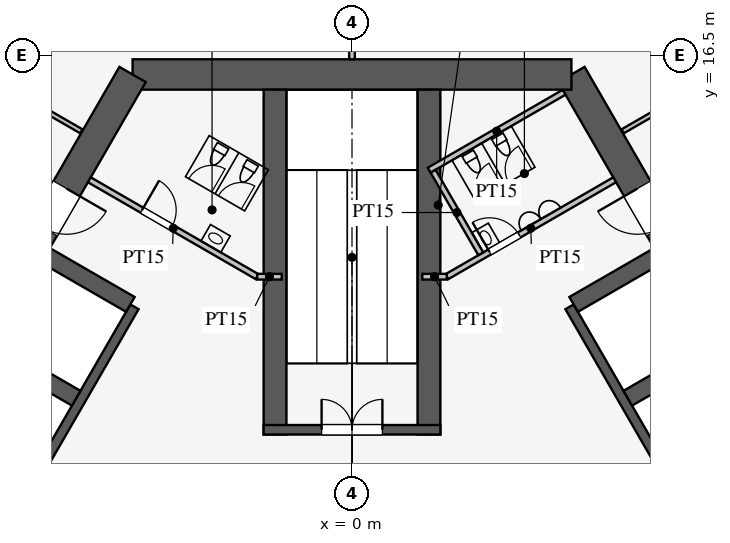
"""IFC4 building model, lengths in metres.
Left out: names, types, materials, properties, quantities, classifications, styles, units other than length and angle.
Written with IfcOpenShell. Run it as: python <this file> out.ifc"""

import sys

from ifc_helpers import new_model, si_unit, direction, frame, frame_2d, origin, place, context, subcontext, project, spatial, rectangle, extrude, element, fill, save


model = new_model("IFC4")
c1 = context("Model", 3, precision=1e-05, world=origin(), true_north=direction((0.0, 1.0)))
c2 = subcontext(c1, "Body", "Model", "MODEL_VIEW")
j1 = project(units=[si_unit("LENGTHUNIT", "METRE"), si_unit("PLANEANGLEUNIT", "RADIAN")], contexts=[c1])
p1 = place(None, origin())
s1 = spatial("IfcSite", under=j1, at=p1, CompositionType="ELEMENT")
p2 = place(p1, origin())
s2 = spatial("IfcBuilding", under=s1, at=p2, CompositionType="ELEMENT")
p3 = place(p2, frame((0.0, 0.0, 92.1)))
s3 = spatial("IfcBuildingStorey", under=s2, at=p3, CompositionType="ELEMENT", Elevation=92.1)
p4 = place(p3, frame((16.743, -3.0, 0.0), z_axis=(0.0, 0.0, 1.0), x_axis=(-0.500002442456, 0.866023993627, 0.0)))
e1 = element("IfcWall", 1, at=p4, inside=s3, PredefinedType="SHEAR", context=c2, shape_type="SweptSolid", body=[
    extrude(rectangle(XDim=21.939, YDim=0.8, at=frame_2d((10.97, 0.0))), origin(), (0.0, 0.0, 1.0), 6.0),
])
p5 = place(p4, frame((17.27, 0.0, 0.0)))
e2 = element("IfcOpeningElement", 2, at=p5, cuts=e1, PredefinedType="OPENING", context=c2, shape_type="SweptSolid", body=[
    extrude(rectangle(XDim=1.2, YDim=2.1, at=frame_2d((0.6, 1.05))), frame((0.0, 0.41, 0.0), z_axis=(0.0, -1.0, 0.0), x_axis=(1.0, 0.0, 0.0)), (0.0, 0.0, 1.0), 0.82),
])
p6 = place(p4, frame((3.47, 0.0, 0.0)))
e3 = element("IfcOpeningElement", 3, at=p6, cuts=e1, PredefinedType="OPENING", context=c2, shape_type="SweptSolid", body=[
    extrude(rectangle(XDim=1.2, YDim=2.1, at=frame_2d((0.6, 1.05))), frame((0.0, 0.41, 0.0), z_axis=(0.0, -1.0, 0.0), x_axis=(1.0, 0.0, 0.0)), (0.0, 0.0, 1.0), 0.82),
])
p7 = place(p3, frame((5.773, 16.0, 0.0), z_axis=(0.0, 0.0, 1.0), x_axis=(-1.0, 0.0, 0.0)))
e4 = element("IfcWall", 4, at=p7, inside=s3, PredefinedType="SHEAR", context=c2, shape_type="SweptSolid", body=[
    extrude(rectangle(XDim=11.547, YDim=0.8, at=frame_2d((5.773, 0.0))), origin(), (0.0, 0.0, 1.0), 6.0),
])
p8 = place(p3, frame((-5.773, 16.0, 0.0), z_axis=(0.0, 0.0, 1.0), x_axis=(-0.500002442456, -0.866023993627, 0.0)))
e5 = element("IfcWall", 5, at=p8, inside=s3, PredefinedType="SHEAR", context=c2, shape_type="SweptSolid", body=[
    extrude(rectangle(XDim=21.939, YDim=0.8, at=frame_2d((10.97, 0.0))), origin(), (0.0, 0.0, 1.0), 6.0),
])
p9 = place(p8, frame((17.27, 0.0, 0.0)))
e6 = element("IfcOpeningElement", 6, at=p9, cuts=e5, PredefinedType="OPENING", context=c2, shape_type="SweptSolid", body=[
    extrude(rectangle(XDim=1.2, YDim=2.1, at=frame_2d((0.6, 1.05))), frame((0.0, 0.41, 0.0), z_axis=(0.0, -1.0, 0.0), x_axis=(1.0, 0.0, 0.0)), (0.0, 0.0, 1.0), 0.82),
])
p10 = place(p8, frame((3.47, 0.0, 0.0)))
e7 = element("IfcOpeningElement", 7, at=p10, cuts=e5, PredefinedType="OPENING", context=c2, shape_type="SweptSolid", body=[
    extrude(rectangle(XDim=1.2, YDim=2.1, at=frame_2d((0.6, 1.05))), frame((0.0, 0.41, 0.0), z_axis=(0.0, -1.0, 0.0), x_axis=(1.0, 0.0, 0.0)), (0.0, 0.0, 1.0), 0.82),
])
p11 = place(p3, frame((11.424, 0.014, 0.0), z_axis=(0.0, 0.0, 1.0), x_axis=(-0.500001763848, 0.866024385424, 0.0)))
e8 = element("IfcWall", 8, at=p11, inside=s3, PredefinedType="SHEAR", context=c2, shape_type="SweptSolid", body=[
    extrude(rectangle(XDim=11.4, YDim=0.25, at=frame_2d((5.7, 0.0))), origin(), (0.0, 0.0, 1.0), 6.0),
])
p12 = place(p3, frame((7.257, 7.481, 0.0), z_axis=(0.0, 0.0, 1.0), x_axis=(0.866046643894, 0.499963209246, 0.0)))
e9 = element("IfcWall", 9, at=p12, inside=s3, PredefinedType="SHEAR", context=c2, shape_type="SweptSolid", body=[
    extrude(rectangle(XDim=2.575, YDim=0.45, at=frame_2d((1.288, 0.0))), origin(), (0.0, 0.0, 1.0), 6.0),
])
p13 = place(p3, frame((5.832, 9.949, 0.0), z_axis=(0.0, 0.0, 1.0), x_axis=(0.866029291668, 0.499993265928, 0.0)))
e10 = element("IfcWall", 10, at=p13, inside=s3, PredefinedType="SHEAR", context=c2, shape_type="SweptSolid", body=[
    extrude(rectangle(XDim=2.575, YDim=0.45, at=frame_2d((1.288, 0.0))), origin(), (0.0, 0.0, 1.0), 6.0),
])
p14 = place(p3, frame((-5.724, 9.886, 0.0), z_axis=(0.0, 0.0, 1.0), x_axis=(-0.500001763848, -0.866024385424, 0.0)))
e11 = element("IfcWall", 11, at=p14, inside=s3, PredefinedType="SHEAR", context=c2, shape_type="SweptSolid", body=[
    extrude(rectangle(XDim=11.4, YDim=0.25, at=frame_2d((5.7, 0.0))), origin(), (0.0, 0.0, 1.0), 6.0),
])
p15 = place(p14, frame((6.525, 0.0, 0.0)))
e12 = element("IfcOpeningElement", 12, at=p15, cuts=e11, PredefinedType="OPENING", context=c2, shape_type="SweptSolid", body=[
    extrude(rectangle(XDim=1.2, YDim=2.2, at=frame_2d((0.6, 1.1))), frame((0.0, 0.135, 0.0), z_axis=(0.0, -1.0, 0.0), x_axis=(1.0, 0.0, 0.0)), (0.0, 0.0, 1.0), 0.27),
])
p16 = place(p14, frame((9.375, 0.0, 0.0)))
e13 = element("IfcOpeningElement", 13, at=p16, cuts=e11, PredefinedType="OPENING", context=c2, shape_type="SweptSolid", body=[
    extrude(rectangle(XDim=1.2, YDim=2.2, at=frame_2d((0.6, 1.1))), frame((0.0, 0.135, 0.0), z_axis=(0.0, -1.0, 0.0), x_axis=(1.0, 0.0, 0.0)), (0.0, 0.0, 1.0), 0.27),
])
p17 = place(p3, frame((-5.832, 9.949, 0.0), z_axis=(0.0, 0.0, 1.0), x_axis=(-0.866029291668, 0.499993265928, 0.0)))
e14 = element("IfcWall", 14, at=p17, inside=s3, PredefinedType="SHEAR", context=c2, shape_type="SweptSolid", body=[
    extrude(rectangle(XDim=2.575, YDim=0.45, at=frame_2d((1.288, 0.0))), origin(), (0.0, 0.0, 1.0), 6.0),
])
p18 = place(p3, frame((-7.257, 7.481, 0.0), z_axis=(0.0, 0.0, 1.0), x_axis=(-0.866046643894, 0.499963209246, 0.0)))
e15 = element("IfcWall", 15, at=p18, inside=s3, PredefinedType="SHEAR", context=c2, shape_type="SweptSolid", body=[
    extrude(rectangle(XDim=2.575, YDim=0.45, at=frame_2d((1.288, 0.0))), origin(), (0.0, 0.0, 1.0), 6.0),
])
for number, where, z_axis, x_axis in (
    (16, (2.025, 6.525, 0.0), (0.0, 0.0, 1.0), (0.0, 1.0, 0.0)),
    (17, (-2.025, 6.525, 0.0), (0.0, 0.0, 1.0), (0.0, 1.0, 0.0)),
):
    element("IfcWall", number, at=place(p3, frame(where, z_axis=z_axis, x_axis=x_axis)), inside=s3, PredefinedType="SHEAR", context=c2, shape_type="SweptSolid", body=[
        extrude(rectangle(XDim=9.075, YDim=0.6, at=frame_2d((4.538, 0.0))), origin(), (0.0, 0.0, 1.0), 6.0),
    ])
p19 = place(p3, frame((2.325, 6.65, 0.0), z_axis=(0.0, 0.0, 1.0), x_axis=(-1.0, 0.0, 0.0)))
e18 = element("IfcWall", 18, at=p19, inside=s3, PredefinedType="SHEAR", context=c2, shape_type="SweptSolid", body=[
    extrude(rectangle(XDim=4.65, YDim=0.25, at=frame_2d((2.325, 0.0))), origin(), (0.0, 0.0, 1.0), 6.0),
])
p20 = place(p19, frame((1.525, 0.0, 0.0)))
e19 = element("IfcOpeningElement", 19, at=p20, cuts=e18, PredefinedType="OPENING", context=c2, shape_type="SweptSolid", body=[
    extrude(rectangle(XDim=1.6, YDim=2.1, at=frame_2d((0.8, 1.05))), frame((0.0, 0.135, 0.0), z_axis=(0.0, -1.0, 0.0), x_axis=(1.0, 0.0, 0.0)), (0.0, 0.0, 1.0), 0.27),
])
p21 = place(p3, frame((2.495, 10.678, 0.0), z_axis=(0.0, 0.0, 1.0), x_axis=(0.86602216432, 0.500005610874, 0.0)))
e20 = element("IfcWall", 20, at=p21, inside=s3, PredefinedType="PARTITIONING", context=c2, shape_type="SweptSolid", body=[
    extrude(rectangle(XDim=5.1, YDim=0.15, at=frame_2d((2.55, 0.0))), origin(), (0.0, 0.0, 1.0), 5.8),
])
p22 = place(p21, frame((1.3, 0.0, 0.0)))
e21 = element("IfcOpeningElement", 21, at=p22, cuts=e20, PredefinedType="OPENING", context=c2, shape_type="SweptSolid", body=[
    extrude(rectangle(XDim=0.9, YDim=2.1, at=frame_2d((0.45, 1.05))), frame((0.0, 0.085, 0.0), z_axis=(0.0, -1.0, 0.0), x_axis=(1.0, 0.0, 0.0)), (0.0, 0.0, 1.0), 0.17),
])
p23 = place(p3, frame((-2.495, 10.678, 0.0), z_axis=(0.0, 0.0, 1.0), x_axis=(-0.86602216432, 0.500005610874, 0.0)))
e22 = element("IfcWall", 22, at=p23, inside=s3, PredefinedType="PARTITIONING", context=c2, shape_type="SweptSolid", body=[
    extrude(rectangle(XDim=5.1, YDim=0.15, at=frame_2d((2.55, 0.0))), origin(), (0.0, 0.0, 1.0), 5.8),
])
p24 = place(p23, frame((2.6, 0.0, 0.0)))
e23 = element("IfcOpeningElement", 23, at=p24, cuts=e22, PredefinedType="OPENING", context=c2, shape_type="SweptSolid", body=[
    extrude(rectangle(XDim=0.9, YDim=2.1, at=frame_2d((0.45, 1.05))), frame((0.0, 0.085, 0.0), z_axis=(0.0, -1.0, 0.0), x_axis=(1.0, 0.0, 0.0)), (0.0, 0.0, 1.0), 0.17),
])
for number, where, z_axis, x_axis in (
    (24, (2.495, 10.678, 0.0), (0.0, 0.0, 1.0), (-1.0, 0.0, 0.0)),
    (25, (-2.495, 10.678, 0.0), (0.0, 0.0, 1.0), (1.0, 0.0, 0.0)),
):
    element("IfcWall", number, at=place(p3, frame(where, z_axis=z_axis, x_axis=x_axis)), inside=s3, PredefinedType="PARTITIONING", context=c2, shape_type="SweptSolid", body=[
        extrude(rectangle(XDim=0.645, YDim=0.15, at=frame_2d((0.323, 0.0))), origin(), (0.0, 0.0, 1.0), 5.8),
    ])
p25 = place(p3, frame((2.031, 13.482, 0.0), z_axis=(0.0, 0.0, 1.0), x_axis=(0.866050731258, 0.499956128963, 0.0)))
e26 = element("IfcWall", 26, at=p25, inside=s3, PredefinedType="PARTITIONING", context=c2, shape_type="SweptSolid", body=[
    extrude(rectangle(XDim=4.1, YDim=0.15, at=frame_2d((2.05, 0.0))), origin(), (0.0, 0.0, 1.0), 5.8),
])
p26 = place(p3, frame((3.389, 11.281, 0.0), z_axis=(0.0, 0.0, 1.0), x_axis=(-0.499989096993, 0.866031698547, 0.0)))
e27 = element("IfcWall", 27, at=p26, inside=s3, PredefinedType="PARTITIONING", context=c2, shape_type="SweptSolid", body=[
    extrude(rectangle(XDim=2.51, YDim=0.15, at=frame_2d((1.255, 0.0))), origin(), (0.0, 0.0, 1.0), 5.8),
])
p27 = place(p3, frame((0.0, 16.4, 0.0), z_axis=(0.0, 0.0, 1.0), x_axis=(0.0, 1.0, 0.0)))
e28 = element("IfcWall", 28, at=p27, inside=s3, PredefinedType="PARTITIONING", context=c2, shape_type="SweptSolid", body=[
    extrude(rectangle(XDim=16.65, YDim=0.15, at=frame_2d((8.325, 0.0))), origin(), (0.0, 0.0, 1.0), 4.1),
])
p28 = place(p3, frame((7.122, 14.504, 0.0), z_axis=(0.0, 0.0, 1.0), x_axis=(0.866023947468, 0.500002522405, 0.0)))
e29 = element("IfcWall", 29, at=p28, inside=s3, PredefinedType="PARTITIONING", context=c2, shape_type="SweptSolid", body=[
    extrude(rectangle(XDim=11.771, YDim=0.12, at=frame_2d((5.886, 0.0))), origin(), (0.0, 0.0, 1.0), 2.9),
])
p29 = place(p28, frame((2.5, 0.0, 0.0)))
e30 = element("IfcOpeningElement", 30, at=p29, cuts=e29, PredefinedType="OPENING", context=c2, shape_type="SweptSolid", body=[
    extrude(rectangle(XDim=1.8, YDim=2.1, at=frame_2d((0.9, 1.05))), frame((0.0, 0.07, 0.0), z_axis=(0.0, -1.0, 0.0), x_axis=(1.0, 0.0, 0.0)), (0.0, 0.0, 1.0), 0.14),
])
p30 = place(p28, frame((7.6, 0.0, 0.0)))
e31 = element("IfcOpeningElement", 31, at=p30, cuts=e29, PredefinedType="OPENING", context=c2, shape_type="SweptSolid", body=[
    extrude(rectangle(XDim=1.8, YDim=2.1, at=frame_2d((0.9, 1.05))), frame((0.0, 0.07, 0.0), z_axis=(0.0, -1.0, 0.0), x_axis=(1.0, 0.0, 0.0)), (0.0, 0.0, 1.0), 0.14),
])
p31 = place(p3, frame((-7.122, 14.504, 0.0), z_axis=(0.0, 0.0, 1.0), x_axis=(-0.866023947468, 0.500002522405, 0.0)))
e32 = element("IfcWall", 32, at=p31, inside=s3, PredefinedType="PARTITIONING", context=c2, shape_type="SweptSolid", body=[
    extrude(rectangle(XDim=11.771, YDim=0.12, at=frame_2d((5.886, 0.0))), origin(), (0.0, 0.0, 1.0), 2.9),
])
p32 = place(p31, frame((2.5, 0.0, 0.0)))
e33 = element("IfcOpeningElement", 33, at=p32, cuts=e32, PredefinedType="OPENING", context=c2, shape_type="SweptSolid", body=[
    extrude(rectangle(XDim=1.8, YDim=2.1, at=frame_2d((0.9, 1.05))), frame((0.0, 0.07, 0.0), z_axis=(0.0, -1.0, 0.0), x_axis=(1.0, 0.0, 0.0)), (0.0, 0.0, 1.0), 0.14),
])
p33 = place(p31, frame((7.6, 0.0, 0.0)))
e34 = element("IfcOpeningElement", 34, at=p33, cuts=e32, PredefinedType="OPENING", context=c2, shape_type="SweptSolid", body=[
    extrude(rectangle(XDim=1.8, YDim=2.1, at=frame_2d((0.9, 1.05))), frame((0.0, 0.07, 0.0), z_axis=(0.0, -1.0, 0.0), x_axis=(1.0, 0.0, 0.0)), (0.0, 0.0, 1.0), 0.14),
])
p34 = place(p22, origin())
e35 = element("IfcDoor", 35, at=p34, inside=s3, OperationType="SINGLE_SWING_LEFT", PredefinedType="DOOR", context=c2, shape_type="SweptSolid", body=[
    extrude(rectangle(XDim=0.9, YDim=2.1, at=frame_2d((0.45, 1.05))), frame((0.0, 0.025, 0.0), z_axis=(0.0, -1.0, 0.0), x_axis=(1.0, 0.0, 0.0)), (0.0, 0.0, 1.0), 0.05),
])
fill(e21, e35)
p35 = place(p24, frame((0.9, 0.0, 0.0), z_axis=(0.0, 0.0, 1.0), x_axis=(-1.0, 0.0, 0.0)))
e36 = element("IfcDoor", 36, at=p35, inside=s3, OperationType="SINGLE_SWING_LEFT", PredefinedType="DOOR", context=c2, shape_type="SweptSolid", body=[
    extrude(rectangle(XDim=0.9, YDim=2.1, at=frame_2d((0.45, 1.05))), frame((0.0, 0.025, 0.0), z_axis=(0.0, -1.0, 0.0), x_axis=(1.0, 0.0, 0.0)), (0.0, 0.0, 1.0), 0.05),
])
fill(e23, e36)
p36 = place(p20, frame((1.6, 0.0, 0.0), z_axis=(0.0, 0.0, 1.0), x_axis=(-1.0, 0.0, 0.0)))
e37 = element("IfcDoor", 37, at=p36, inside=s3, OperationType="DOUBLE_DOOR_SINGLE_SWING", PredefinedType="DOOR", context=c2, shape_type="SweptSolid", body=[
    extrude(rectangle(XDim=1.6, YDim=2.1, at=frame_2d((0.8, 1.05))), frame((0.0, 0.025, 0.0), z_axis=(0.0, -1.0, 0.0), x_axis=(1.0, 0.0, 0.0)), (0.0, 0.0, 1.0), 0.05),
])
fill(e19, e37)
p37 = place(p5, origin())
e38 = element("IfcDoor", 38, at=p37, inside=s3, OperationType="SINGLE_SWING_RIGHT", PredefinedType="DOOR", context=c2, shape_type="SweptSolid", body=[
    extrude(rectangle(XDim=1.2, YDim=2.1, at=frame_2d((0.6, 1.05))), frame((0.0, 0.025, 0.0), z_axis=(0.0, -1.0, 0.0), x_axis=(1.0, 0.0, 0.0)), (0.0, 0.0, 1.0), 0.05),
])
fill(e2, e38)
p38 = place(p10, origin())
e39 = element("IfcDoor", 39, at=p38, inside=s3, OperationType="SINGLE_SWING_LEFT", PredefinedType="DOOR", context=c2, shape_type="SweptSolid", body=[
    extrude(rectangle(XDim=1.2, YDim=2.1, at=frame_2d((0.6, 1.05))), frame((0.0, 0.025, 0.0), z_axis=(0.0, -1.0, 0.0), x_axis=(1.0, 0.0, 0.0)), (0.0, 0.0, 1.0), 0.05),
])
fill(e7, e39)
save(model, sys.argv[1])
